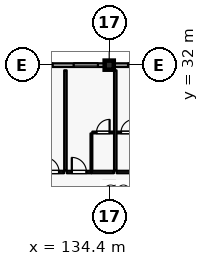
"""IFC4 building model, lengths in metres.
Left out: names, types, materials, properties, quantities, classifications, styles, units other than length and angle.
Written with IfcOpenShell. Run it as: python <this file> out.ifc"""

import sys

from ifc_helpers import new_model, si_unit, direction, frame, frame_2d, origin, origin_2d, place, context, subcontext, project, spatial, rectangle, extrude, element, fill, save


model = new_model("IFC4")
c1 = context("Model", 3, precision=1e-05, world=origin(), true_north=direction((0.0, 1.0)))
c2 = subcontext(c1, "Body", "Model", "MODEL_VIEW")
j1 = project(units=[si_unit("LENGTHUNIT", "METRE"), si_unit("PLANEANGLEUNIT", "RADIAN")], contexts=[c1])
p1 = place(None, origin())
s1 = spatial("IfcSite", under=j1, at=p1, CompositionType="ELEMENT")
p2 = place(p1, origin())
s2 = spatial("IfcBuilding", under=s1, at=p2, CompositionType="ELEMENT")
p3 = place(p2, frame((0.0, 0.0, 39.6)))
s3 = spatial("IfcBuildingStorey", under=s2, at=p3, CompositionType="ELEMENT", Elevation=39.6)
for number, where, z_axis, x_axis in (
    (1, (134.4, 32.0, 0.0), (0.0, 0.0, 1.0), (1.0, 0.0, 0.0)),
    (2, (134.4, 24.0, 0.0), (0.0, 0.0, 1.0), (1.0, 0.0, 0.0)),
):
    element("IfcColumn", number, at=place(p3, frame(where, z_axis=z_axis, x_axis=x_axis)), inside=s3, PredefinedType="COLUMN", context=c2, shape_type="SweptSolid", body=[
        extrude(rectangle(XDim=0.6, YDim=0.6, at=origin_2d()), origin(), (0.0, 0.0, 1.0), 3.6),
    ])
p4 = place(p3, frame((126.3, 32.0, 0.0), z_axis=(0.0, 0.0, 1.0), x_axis=(1.0, 0.0, 0.0)))
e3 = element("IfcWall", 3, at=p4, inside=s3, PredefinedType="SOLIDWALL", context=c2, shape_type="SweptSolid", body=[
    extrude(rectangle(XDim=7.8, YDim=0.24, at=frame_2d((3.9, 0.0))), origin(), (0.0, 0.0, 1.0), 2.89),
])
p5 = place(p4, frame((0.12, 0.0, 0.8)))
e4 = element("IfcOpeningElement", 4, at=p5, cuts=e3, PredefinedType="OPENING", context=c2, shape_type="SweptSolid", body=[
    extrude(rectangle(XDim=1.6, YDim=1.6, at=frame_2d((0.8, 0.8))), frame((0.0, 0.13, 0.0), z_axis=(0.0, -1.0, 0.0), x_axis=(1.0, 0.0, 0.0)), (0.0, 0.0, 1.0), 0.26),
])
p6 = place(p4, frame((2.78, 0.0, 0.8)))
e5 = element("IfcOpeningElement", 5, at=p6, cuts=e3, PredefinedType="OPENING", context=c2, shape_type="SweptSolid", body=[
    extrude(rectangle(XDim=1.6, YDim=1.6, at=frame_2d((0.8, 0.8))), frame((0.0, 0.13, 0.0), z_axis=(0.0, -1.0, 0.0), x_axis=(1.0, 0.0, 0.0)), (0.0, 0.0, 1.0), 0.26),
])
p7 = place(p4, frame((5.76, 0.0, 0.8)))
e6 = element("IfcOpeningElement", 6, at=p7, cuts=e3, PredefinedType="OPENING", context=c2, shape_type="SweptSolid", body=[
    extrude(rectangle(XDim=1.6, YDim=1.6, at=frame_2d((0.8, 0.8))), frame((0.0, 0.13, 0.0), z_axis=(0.0, -1.0, 0.0), x_axis=(1.0, 0.0, 0.0)), (0.0, 0.0, 1.0), 0.26),
])
p8 = place(p3, frame((134.7, 32.0, 0.0), z_axis=(0.0, 0.0, 1.0), x_axis=(1.0, 0.0, 0.0)))
e7 = element("IfcWall", 7, at=p8, inside=s3, PredefinedType="SOLIDWALL", context=c2, shape_type="SweptSolid", body=[
    extrude(rectangle(XDim=7.8, YDim=0.24, at=frame_2d((3.9, 0.0))), origin(), (0.0, 0.0, 1.0), 2.94),
])
p9 = place(p8, frame((0.94, 0.0, 0.8)))
e8 = element("IfcOpeningElement", 8, at=p9, cuts=e7, PredefinedType="OPENING", context=c2, shape_type="SweptSolid", body=[
    extrude(rectangle(XDim=1.6, YDim=1.6, at=frame_2d((0.8, 0.8))), frame((0.0, 0.13, 0.0), z_axis=(0.0, -1.0, 0.0), x_axis=(1.0, 0.0, 0.0)), (0.0, 0.0, 1.0), 0.26),
])
p10 = place(p8, frame((4.22, 0.0, 0.8)))
e9 = element("IfcOpeningElement", 9, at=p10, cuts=e7, PredefinedType="OPENING", context=c2, shape_type="SweptSolid", body=[
    extrude(rectangle(XDim=1.6, YDim=1.6, at=frame_2d((0.8, 0.8))), frame((0.0, 0.13, 0.0), z_axis=(0.0, -1.0, 0.0), x_axis=(1.0, 0.0, 0.0)), (0.0, 0.0, 1.0), 0.26),
])
p11 = place(p3, frame((129.81, 24.97, 0.0), z_axis=(0.0, 0.0, 1.0), x_axis=(1.0, 0.0, 0.0)))
e10 = element("IfcWall", 10, at=p11, inside=s3, PredefinedType="PARTITIONING", context=c2, shape_type="SweptSolid", body=[
    extrude(rectangle(XDim=1.62, YDim=0.16, at=frame_2d((0.81, 0.0))), origin(), (0.0, 0.0, 1.0), 3.335),
])
p12 = place(p11, frame((0.33, 0.0, 0.0)))
e11 = element("IfcOpeningElement", 11, at=p12, cuts=e10, PredefinedType="OPENING", context=c2, shape_type="SweptSolid", body=[
    extrude(rectangle(XDim=0.96, YDim=2.2, at=frame_2d((0.48, 1.1))), frame((0.0, 0.09, 0.0), z_axis=(0.0, -1.0, 0.0), x_axis=(1.0, 0.0, 0.0)), (0.0, 0.0, 1.0), 0.18),
])
p13 = place(p3, frame((131.61, 24.97, 0.0), z_axis=(0.0, 0.0, 1.0), x_axis=(1.0, 0.0, 0.0)))
e12 = element("IfcWall", 12, at=p13, inside=s3, PredefinedType="PARTITIONING", context=c2, shape_type="SweptSolid", body=[
    extrude(rectangle(XDim=1.62, YDim=0.16, at=frame_2d((0.81, 0.0))), origin(), (0.0, 0.0, 1.0), 3.335),
])
p14 = place(p13, frame((0.33, 0.0, 0.0)))
e13 = element("IfcOpeningElement", 13, at=p14, cuts=e12, PredefinedType="OPENING", context=c2, shape_type="SweptSolid", body=[
    extrude(rectangle(XDim=0.96, YDim=2.2, at=frame_2d((0.48, 1.1))), frame((0.0, 0.09, 0.0), z_axis=(0.0, -1.0, 0.0), x_axis=(1.0, 0.0, 0.0)), (0.0, 0.0, 1.0), 0.18),
])
p15 = place(p3, frame((133.24, 24.97, 0.0), z_axis=(0.0, 0.0, 1.0), x_axis=(1.0, 0.0, 0.0)))
e14 = element("IfcWall", 14, at=p15, inside=s3, PredefinedType="PARTITIONING", context=c2, shape_type="SweptSolid", body=[
    extrude(rectangle(XDim=1.47, YDim=0.16, at=frame_2d((0.735, 0.0))), origin(), (0.0, 0.0, 1.0), 3.335),
])
p16 = place(p3, frame((133.23, 25.06, 0.0), z_axis=(0.0, 0.0, 1.0), x_axis=(0.0, 1.0, 0.0)))
e15 = element("IfcWall", 15, at=p16, inside=s3, PredefinedType="PARTITIONING", context=c2, shape_type="SweptSolid", body=[
    extrude(rectangle(XDim=2.45, YDim=0.115, at=frame_2d((1.225, 0.0))), origin(), (0.0, 0.0, 1.0), 3.335),
])
p17 = place(p3, frame((133.29, 27.57, 0.0), z_axis=(0.0, 0.0, 1.0), x_axis=(1.0, 0.0, 0.0)))
e16 = element("IfcWall", 16, at=p17, inside=s3, PredefinedType="PARTITIONING", context=c2, shape_type="SweptSolid", body=[
    extrude(rectangle(XDim=1.41, YDim=0.115, at=frame_2d((0.705, 0.0))), origin(), (0.0, 0.0, 1.0), 3.335),
])
p18 = place(p17, frame((0.275, 0.0, 0.0)))
e17 = element("IfcOpeningElement", 17, at=p18, cuts=e16, PredefinedType="OPENING", context=c2, shape_type="SweptSolid", body=[
    extrude(rectangle(XDim=0.86, YDim=2.12, at=frame_2d((0.43, 1.06))), frame((0.0, 0.067, 0.0), z_axis=(0.0, -1.0, 0.0), x_axis=(1.0, 0.0, 0.0)), (0.0, 0.0, 1.0), 0.135),
])
p19 = place(p3, frame((131.52, 25.06, 0.0), z_axis=(0.0, 0.0, 1.0), x_axis=(0.0, 1.0, 0.0)))
e18 = element("IfcWall", 18, at=p19, inside=s3, PredefinedType="PARTITIONING", context=c2, shape_type="SweptSolid", body=[
    extrude(rectangle(XDim=6.6, YDim=0.16, at=frame_2d((3.3, 0.0))), origin(), (0.0, 0.0, 1.0), 3.335),
])
p20 = place(p3, frame((134.89, 24.97, 0.0), z_axis=(0.0, 0.0, 1.0), x_axis=(1.0, 0.0, 0.0)))
e19 = element("IfcWall", 19, at=p20, inside=s3, PredefinedType="PARTITIONING", context=c2, shape_type="SweptSolid", body=[
    extrude(rectangle(XDim=1.47, YDim=0.16, at=frame_2d((0.735, 0.0))), origin(), (0.0, 0.0, 1.0), 3.335),
])
p21 = place(p3, frame((134.9, 27.57, 0.0), z_axis=(0.0, 0.0, 1.0), x_axis=(1.0, 0.0, 0.0)))
e20 = element("IfcWall", 20, at=p21, inside=s3, PredefinedType="PARTITIONING", context=c2, shape_type="SweptSolid", body=[
    extrude(rectangle(XDim=1.41, YDim=0.115, at=frame_2d((0.705, 0.0))), origin(), (0.0, 0.0, 1.0), 3.335),
])
p22 = place(p21, frame((0.275, 0.0, 0.0)))
e21 = element("IfcOpeningElement", 21, at=p22, cuts=e20, PredefinedType="OPENING", context=c2, shape_type="SweptSolid", body=[
    extrude(rectangle(XDim=0.86, YDim=2.12, at=frame_2d((0.43, 1.06))), frame((0.0, 0.067, 0.0), z_axis=(0.0, -1.0, 0.0), x_axis=(1.0, 0.0, 0.0)), (0.0, 0.0, 1.0), 0.135),
])
p23 = place(p3, frame((134.8, 25.06, 0.0), z_axis=(0.0, 0.0, 1.0), x_axis=(0.0, 1.0, 0.0)))
e22 = element("IfcWall", 22, at=p23, inside=s3, PredefinedType="PARTITIONING", context=c2, shape_type="SweptSolid", body=[
    extrude(rectangle(XDim=6.6, YDim=0.16, at=frame_2d((3.3, 0.0))), origin(), (0.0, 0.0, 1.0), 3.335),
])
p24 = place(p6, origin())
e23 = element("IfcWindow", 23, at=p24, inside=s3, PartitioningType="SINGLE_PANEL", PredefinedType="WINDOW", context=c2, shape_type="SweptSolid", body=[
    extrude(rectangle(XDim=1.6, YDim=1.6, at=frame_2d((0.8, 0.8))), frame((0.0, 0.03, 0.0), z_axis=(0.0, -1.0, 0.0), x_axis=(1.0, 0.0, 0.0)), (0.0, 0.0, 1.0), 0.06),
])
fill(e5, e23)
p25 = place(p7, origin())
e24 = element("IfcWindow", 24, at=p25, inside=s3, PartitioningType="SINGLE_PANEL", PredefinedType="WINDOW", context=c2, shape_type="SweptSolid", body=[
    extrude(rectangle(XDim=1.6, YDim=1.6, at=frame_2d((0.8, 0.8))), frame((0.0, 0.03, 0.0), z_axis=(0.0, -1.0, 0.0), x_axis=(1.0, 0.0, 0.0)), (0.0, 0.0, 1.0), 0.06),
])
fill(e6, e24)
p26 = place(p9, origin())
e25 = element("IfcWindow", 25, at=p26, inside=s3, PartitioningType="SINGLE_PANEL", PredefinedType="WINDOW", context=c2, shape_type="SweptSolid", body=[
    extrude(rectangle(XDim=1.6, YDim=1.6, at=frame_2d((0.8, 0.8))), frame((0.0, 0.03, 0.0), z_axis=(0.0, -1.0, 0.0), x_axis=(1.0, 0.0, 0.0)), (0.0, 0.0, 1.0), 0.06),
])
fill(e8, e25)
p27 = place(p12, origin())
e26 = element("IfcDoor", 26, at=p27, inside=s3, OperationType="SINGLE_SWING_LEFT", PredefinedType="DOOR", context=c2, shape_type="SweptSolid", body=[
    extrude(rectangle(XDim=0.96, YDim=2.2, at=frame_2d((0.48, 1.1))), frame((0.0, 0.025, 0.0), z_axis=(0.0, -1.0, 0.0), x_axis=(1.0, 0.0, 0.0)), (0.0, 0.0, 1.0), 0.05),
])
fill(e11, e26)
p28 = place(p14, origin())
e27 = element("IfcDoor", 27, at=p28, inside=s3, OperationType="SINGLE_SWING_LEFT", PredefinedType="DOOR", context=c2, shape_type="SweptSolid", body=[
    extrude(rectangle(XDim=0.96, YDim=2.2, at=frame_2d((0.48, 1.1))), frame((0.0, 0.025, 0.0), z_axis=(0.0, -1.0, 0.0), x_axis=(1.0, 0.0, 0.0)), (0.0, 0.0, 1.0), 0.05),
])
fill(e13, e27)
p29 = place(p18, origin())
e28 = element("IfcDoor", 28, at=p29, inside=s3, OperationType="SINGLE_SWING_RIGHT", PredefinedType="DOOR", context=c2, shape_type="SweptSolid", body=[
    extrude(rectangle(XDim=0.86, YDim=2.12, at=frame_2d((0.43, 1.06))), frame((0.0, 0.025, 0.0), z_axis=(0.0, -1.0, 0.0), x_axis=(1.0, 0.0, 0.0)), (0.0, 0.0, 1.0), 0.05),
])
fill(e17, e28)
p30 = place(p22, origin())
e29 = element("IfcDoor", 29, at=p30, inside=s3, OperationType="SINGLE_SWING_RIGHT", PredefinedType="DOOR", context=c2, shape_type="SweptSolid", body=[
    extrude(rectangle(XDim=0.86, YDim=2.12, at=frame_2d((0.43, 1.06))), frame((0.0, 0.025, 0.0), z_axis=(0.0, -1.0, 0.0), x_axis=(1.0, 0.0, 0.0)), (0.0, 0.0, 1.0), 0.05),
])
fill(e21, e29)
save(model, sys.argv[1])
